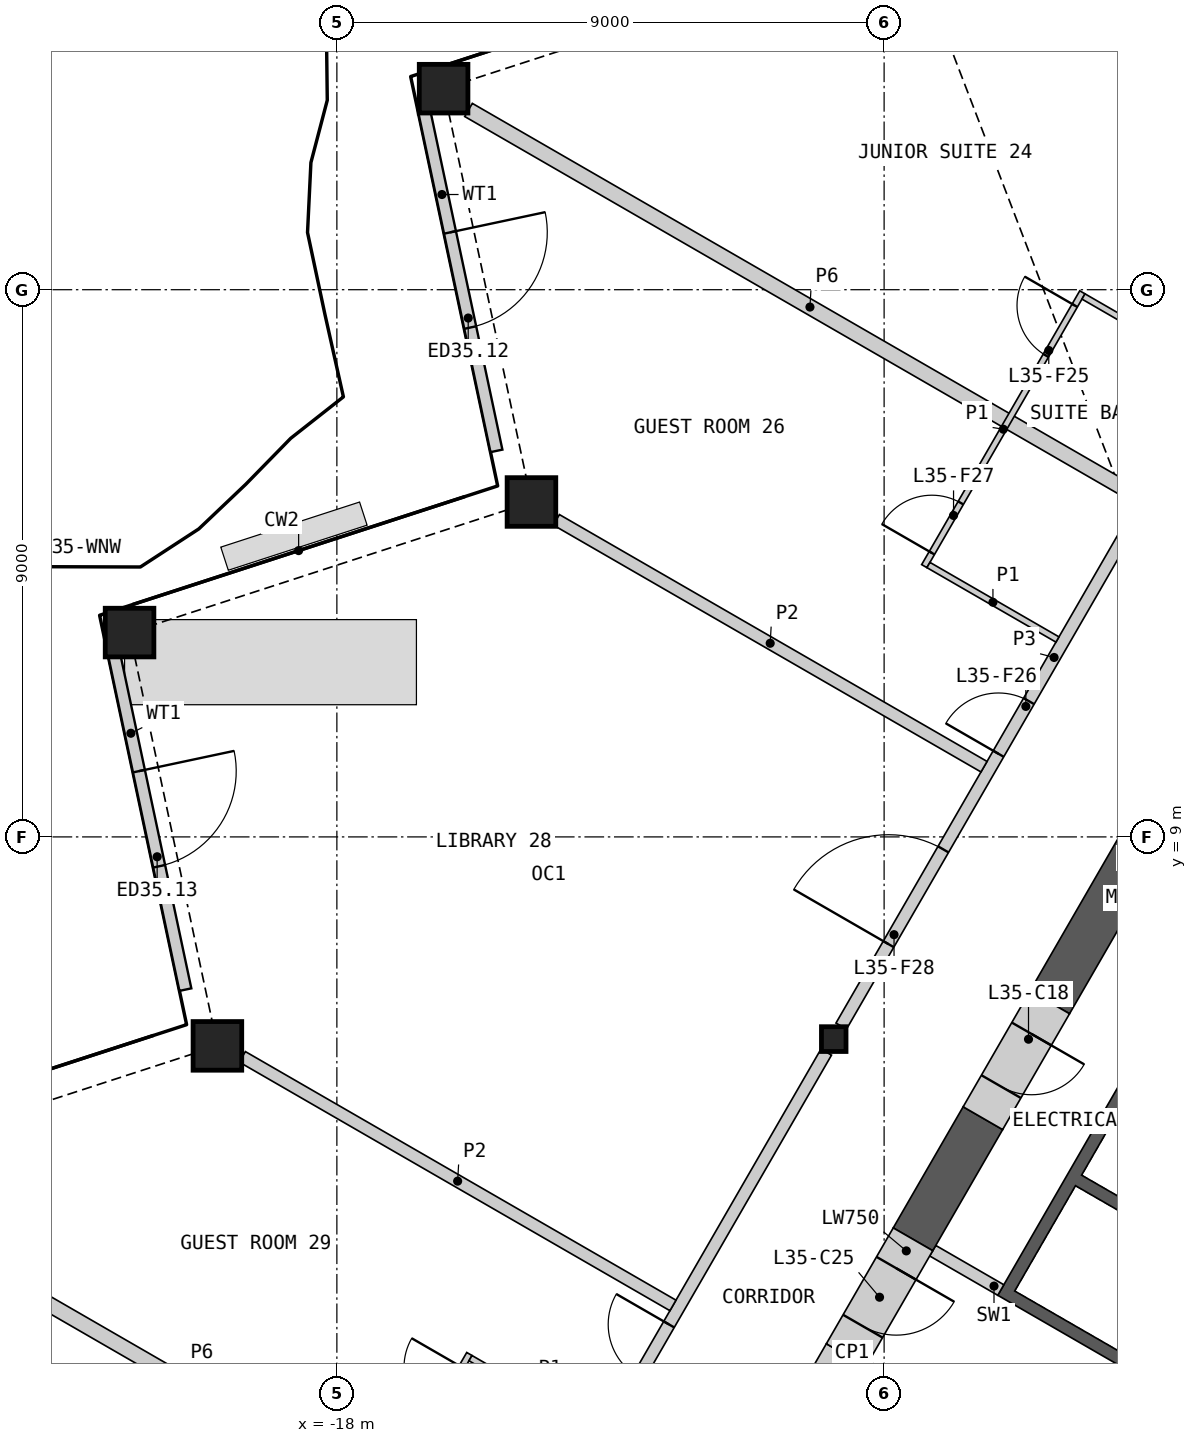
"""IFC4 building model, lengths in metres.
Left out: names, types, materials, properties, quantities, classifications, styles, units other than length and angle.
Written with IfcOpenShell. Run it as: python <this file> out.ifc"""

import sys

from ifc_helpers import new_model, si_unit, direction, frame, frame_2d, origin, origin_2d, place, context, subcontext, project, spatial, polyline, rectangle, hollow_rectangle, i_section, outline, extrude, element, fill, save


model = new_model("IFC4")
c1 = context("Model", 3, precision=1e-05, world=origin(), true_north=direction((0.0, 1.0)))
c2 = subcontext(c1, "Body", "Model", "MODEL_VIEW")
j1 = project(units=[si_unit("LENGTHUNIT", "METRE"), si_unit("PLANEANGLEUNIT", "RADIAN")], contexts=[c1])
p1 = place(None, origin())
s1 = spatial("IfcSite", under=j1, at=p1, CompositionType="ELEMENT")
p2 = place(p1, origin())
s2 = spatial("IfcBuilding", under=s1, at=p2, CompositionType="ELEMENT")
p3 = place(p2, frame((0.0, 0.0, 169.2)))
s3 = spatial("IfcBuildingStorey", under=s2, at=p3, CompositionType="ELEMENT", Elevation=169.2)
for number, where, z_axis, x_axis in (
    (1, (-16.245, 21.306, 0.0), (0.0, 0.0, 1.0), (1.0, 0.0, 0.0)),
    (2, (-14.8, 14.508, 0.0), (0.0, 0.0, 1.0), (1.0, 0.0, 0.0)),
    (3, (-21.409, 12.361, 0.0), (0.0, 0.0, 1.0), (1.0, 0.0, 0.0)),
    (4, (-19.965, 5.563, 0.0), (0.0, 0.0, 1.0), (1.0, 0.0, 0.0)),
):
    element("IfcColumn", number, at=place(p3, frame(where, z_axis=z_axis, x_axis=x_axis)), inside=s3, PredefinedType="COLUMN", context=c2, shape_type="SweptSolid", body=[
        extrude(hollow_rectangle(XDim=0.8, YDim=0.8, WallThickness=0.05, at=origin_2d()), origin(), (0.0, 0.0, 1.0), 3.6),
    ])
p4 = place(p3, frame((-9.828, 5.675, 0.0), z_axis=(0.0, 0.0, 1.0), x_axis=(1.0, 0.0, 0.0)))
e5 = element("IfcColumn", 5, at=p4, inside=s3, PredefinedType="COLUMN", context=c2, shape_type="SweptSolid", body=[
    extrude(i_section(OverallWidth=0.404, OverallDepth=0.407, WebThickness=0.027, FlangeThickness=0.044, at=origin_2d()), origin(), (0.0, 0.0, 1.0), 3.6),
])
p5 = place(p3, frame((-16.571, 20.971, 0.0), z_axis=(0.0, 0.0, 1.0), x_axis=(0.207872471739, -0.978155936184, 0.0)))
e6 = element("IfcWall", 6, at=p5, inside=s3, PredefinedType="SOLIDWALL", context=c2, shape_type="SweptSolid", body=[
    extrude(rectangle(XDim=5.748, YDim=0.2, at=frame_2d((2.874, 0.0))), origin(), (0.0, 0.0, 1.0), 2.701),
])
p6 = place(p5, frame((2.074, 0.0, 0.0)))
e7 = element("IfcOpeningElement", 7, at=p6, cuts=e6, PredefinedType="OPENING", context=c2, shape_type="SweptSolid", body=[
    extrude(rectangle(XDim=1.6, YDim=2.4, at=frame_2d((0.8, 1.2))), frame((0.0, 0.11, 0.0), z_axis=(0.0, -1.0, 0.0), x_axis=(1.0, 0.0, 0.0)), (0.0, 0.0, 1.0), 0.22),
])
p7 = place(p3, frame((-21.686, 12.111, 0.0), z_axis=(0.0, 0.0, 1.0), x_axis=(0.207872471739, -0.978155936184, 0.0)))
e8 = element("IfcWall", 8, at=p7, inside=s3, PredefinedType="SOLIDWALL", context=c2, shape_type="SweptSolid", body=[
    extrude(rectangle(XDim=5.748, YDim=0.2, at=frame_2d((2.874, 0.0))), origin(), (0.0, 0.0, 1.0), 2.701),
])
p8 = place(p7, frame((2.074, 0.0, 0.0)))
e9 = element("IfcOpeningElement", 9, at=p8, cuts=e8, PredefinedType="OPENING", context=c2, shape_type="SweptSolid", body=[
    extrude(rectangle(XDim=1.6, YDim=2.4, at=frame_2d((0.8, 1.2))), frame((0.0, 0.11, 0.0), z_axis=(0.0, -1.0, 0.0), x_axis=(1.0, 0.0, 0.0)), (0.0, 0.0, 1.0), 0.22),
])
p9 = place(p3, origin())
e10 = element("IfcWall", 10, at=p9, inside=s3, PredefinedType="SHEAR", context=c2, shape_type="SweptSolid", body=[
    extrude(outline(polyline([(-4.96, 0.208), (-7.131, 1.461), (-3.731, 7.35), (-1.561, 6.097), (-1.66, 5.924), (-3.652, 7.074), (-4.652, 5.342), (-2.66, 4.192), (-2.76, 4.019), (-4.752, 5.169), (-5.752, 3.437), (-3.76, 2.287), (-3.861, 2.113), (-5.852, 3.263), (-6.852, 1.531), (-4.861, 0.381), (-4.96, 0.208)])), origin(), (0.0, 0.0, 1.0), 3.25),
])
for number, where, z_axis, x_axis in (
    (11, (-7.081, 1.548, 0.0), (0.0, 0.0, 1.0), (-0.866, 0.5, 0.0)),
    (12, (-8.181, -0.357, 0.0), (0.0, 0.0, 1.0), (-0.866, 0.5, 0.0)),
):
    element("IfcWall", number, at=place(p3, frame(where, z_axis=z_axis, x_axis=x_axis)), inside=s3, PredefinedType="SHEAR", context=c2, shape_type="SweptSolid", body=[
        extrude(rectangle(XDim=1.293, YDim=0.2, at=frame_2d((0.646, 0.0))), origin(), (0.0, 0.0, 1.0), 3.25),
    ])
p10 = place(p3, frame((-4.817, 8.804, 0.0), z_axis=(0.0, 0.0, 1.0), x_axis=(-0.500029273391, -0.866008502124, 0.0)))
e13 = element("IfcWall", 13, at=p10, inside=s3, PredefinedType="SHEAR", context=c2, shape_type="SweptSolid", body=[
    extrude(rectangle(XDim=2.916, YDim=0.75, at=frame_2d((1.458, 0.0))), origin(), (0.0, 0.0, 1.0), 3.25),
])
p11 = place(p3, frame((-7.375, 4.374, 0.0), z_axis=(0.0, 0.0, 1.0), x_axis=(-0.499952165731, -0.866053019151, 0.0)))
e14 = element("IfcWall", 14, at=p11, inside=s3, PredefinedType="SHEAR", context=c2, shape_type="SweptSolid", body=[
    extrude(rectangle(XDim=2.3, YDim=0.75, at=frame_2d((1.15, 0.0))), origin(), (0.0, 0.0, 1.0), 3.25),
])
p12 = place(p3, frame((-6.275, 6.279, 0.0), z_axis=(0.0, 0.0, 1.0), x_axis=(-0.499946605688, -0.86605622881, 0.0)))
e15 = element("IfcWall", 15, at=p12, inside=s3, PredefinedType="SHEAR", context=c2, shape_type="SweptSolid", body=[
    extrude(rectangle(XDim=2.2, YDim=0.75, at=frame_2d((1.1, 0.0))), origin(), (0.0, 0.0, 1.0), 3.25),
])
p13 = place(p12, frame((0.6, 0.0, 0.0)))
e16 = element("IfcOpeningElement", 16, at=p13, cuts=e15, PredefinedType="OPENING", context=c2, shape_type="SweptSolid", body=[
    extrude(rectangle(XDim=1.0, YDim=2.1, at=frame_2d((0.5, 1.05))), frame((0.0, 0.385, 0.0), z_axis=(0.0, -1.0, 0.0), x_axis=(1.0, 0.0, 0.0)), (0.0, 0.0, 1.0), 0.77),
])
p14 = place(p3, frame((-9.625, 0.477, 0.0), z_axis=(0.0, 0.0, 1.0), x_axis=(-0.499995718215, -0.86602787586, 0.0)))
e17 = element("IfcWall", 17, at=p14, inside=s3, PredefinedType="SHEAR", context=c2, shape_type="SweptSolid", body=[
    extrude(rectangle(XDim=3.016, YDim=0.75, at=frame_2d((1.508, 0.0))), origin(), (0.0, 0.0, 1.0), 3.25),
])
p15 = place(p14, frame((1.4, 0.0, 0.0)))
e18 = element("IfcOpeningElement", 18, at=p15, cuts=e17, PredefinedType="OPENING", context=c2, shape_type="SweptSolid", body=[
    extrude(rectangle(XDim=1.0, YDim=2.1, at=frame_2d((0.5, 1.05))), frame((0.0, 0.385, 0.0), z_axis=(0.0, -1.0, 0.0), x_axis=(1.0, 0.0, 0.0)), (0.0, 0.0, 1.0), 0.77),
])
p16 = place(p3, frame((-8.525, 2.382, 0.0), z_axis=(0.0, 0.0, 1.0), x_axis=(-0.500077893725, -0.86598042715, 0.0)))
e19 = element("IfcWall", 19, at=p16, inside=s3, PredefinedType="SHEAR", context=c2, shape_type="SweptSolid", body=[
    extrude(rectangle(XDim=2.2, YDim=0.75, at=frame_2d((1.1, 0.0))), origin(), (0.0, 0.0, 1.0), 3.25),
])
p17 = place(p16, frame((0.55, 0.0, 0.0)))
e20 = element("IfcOpeningElement", 20, at=p17, cuts=e19, PredefinedType="OPENING", context=c2, shape_type="SweptSolid", body=[
    extrude(rectangle(XDim=1.1, YDim=2.1, at=frame_2d((0.55, 1.05))), frame((0.0, 0.385, 0.0), z_axis=(0.0, -1.0, 0.0), x_axis=(1.0, 0.0, 0.0)), (0.0, 0.0, 1.0), 0.77),
])
p18 = place(p3, frame((-26.164, 3.292, 0.0), z_axis=(0.0, 0.0, 1.0), x_axis=(0.866022412254, -0.500005181446, 0.0)))
e21 = element("IfcWall", 21, at=p18, inside=s3, PredefinedType="PARTITIONING", context=c2, shape_type="SweptSolid", body=[
    extrude(rectangle(XDim=13.081, YDim=0.25, at=frame_2d((6.541, 0.0))), origin(), (0.0, 0.0, 1.0), 2.404),
])
p19 = place(p3, frame((-15.835, 20.956, 0.0), z_axis=(0.0, 0.0, 1.0), x_axis=(0.866029765546, -0.499992445131, 0.0)))
e22 = element("IfcWall", 22, at=p19, inside=s3, PredefinedType="PARTITIONING", context=c2, shape_type="SweptSolid", body=[
    extrude(rectangle(XDim=12.968, YDim=0.25, at=frame_2d((6.484, 0.0))), origin(), (0.0, 0.0, 1.0), 2.404),
])
p20 = place(p3, frame((-9.705, 5.888, 0.0), z_axis=(0.0, 0.0, 1.0), x_axis=(0.50000393355, 0.866023132736, 0.0)))
e23 = element("IfcWall", 23, at=p20, inside=s3, PredefinedType="PARTITIONING", context=c2, shape_type="SweptSolid", body=[
    extrude(rectangle(XDim=9.335, YDim=0.2, at=frame_2d((4.667, 0.0))), origin(), (0.0, 0.0, 1.0), 3.25),
])
p21 = place(p20, frame((5.172, 0.0, 0.0)))
e24 = element("IfcOpeningElement", 24, at=p21, cuts=e23, PredefinedType="OPENING", context=c2, shape_type="SweptSolid", body=[
    extrude(rectangle(XDim=1.0, YDim=2.1, at=frame_2d((0.5, 1.05))), frame((0.0, 0.11, 0.0), z_axis=(0.0, -1.0, 0.0), x_axis=(1.0, 0.0, 0.0)), (0.0, 0.0, 1.0), 0.22),
])
p22 = place(p20, frame((1.556, 0.0, 0.0)))
e25 = element("IfcOpeningElement", 25, at=p22, cuts=e23, PredefinedType="OPENING", context=c2, shape_type="SweptSolid", body=[
    extrude(rectangle(XDim=1.8, YDim=2.1, at=frame_2d((0.9, 1.05))), frame((0.0, 0.11, 0.0), z_axis=(0.0, -1.0, 0.0), x_axis=(1.0, 0.0, 0.0)), (0.0, 0.0, 1.0), 0.22),
])
p23 = place(p3, frame((-14.619, -2.624, 0.0), z_axis=(0.0, 0.0, 1.0), x_axis=(0.50000393355, 0.866023132736, 0.0)))
e26 = element("IfcWall", 26, at=p23, inside=s3, PredefinedType="PARTITIONING", context=c2, shape_type="SweptSolid", body=[
    extrude(rectangle(XDim=9.335, YDim=0.2, at=frame_2d((4.667, 0.0))), origin(), (0.0, 0.0, 1.0), 3.25),
])
p24 = place(p23, frame((3.163, 0.0, 0.0)))
e27 = element("IfcOpeningElement", 27, at=p24, cuts=e26, PredefinedType="OPENING", context=c2, shape_type="SweptSolid", body=[
    extrude(rectangle(XDim=1.0, YDim=2.1, at=frame_2d((0.5, 1.05))), frame((0.0, 0.11, 0.0), z_axis=(0.0, -1.0, 0.0), x_axis=(1.0, 0.0, 0.0)), (0.0, 0.0, 1.0), 0.22),
])
p25 = place(p3, frame((-11.231, 29.842, 0.0), z_axis=(0.0, 0.0, 1.0), x_axis=(0.66019067586, -0.751098043871, 0.0)))
e28 = element("IfcWall", 28, at=p25, inside=s3, PredefinedType="PARTITIONING", context=c2, shape_type="SweptSolid", body=[
    extrude(rectangle(XDim=13.938, YDim=0.2, at=frame_2d((6.969, 0.0))), origin(), (0.0, 0.0, 1.0), 2.404),
])
p26 = place(p3, frame((-19.555, 5.383, 0.0), z_axis=(0.0, 0.0, 1.0), x_axis=(0.866027979776, -0.499995538225, 0.0)))
e29 = element("IfcWall", 29, at=p26, inside=s3, PredefinedType="PARTITIONING", context=c2, shape_type="SweptSolid", body=[
    extrude(rectangle(XDim=8.177, YDim=0.2, at=frame_2d((4.089, 0.0))), origin(), (0.0, 0.0, 1.0), 2.404),
])
p27 = place(p3, frame((-14.39, 14.215, 0.0), z_axis=(0.0, 0.0, 1.0), x_axis=(0.86602738064, -0.499996575971, 0.0)))
e30 = element("IfcWall", 30, at=p27, inside=s3, PredefinedType="PARTITIONING", context=c2, shape_type="SweptSolid", body=[
    extrude(rectangle(XDim=8.121, YDim=0.2, at=frame_2d((4.06, 0.0))), origin(), (0.0, 0.0, 1.0), 2.404),
])
p28 = place(p3, frame((-18.421, -4.008, 0.0), z_axis=(0.0, 0.0, 1.0), x_axis=(0.500006934395, 0.866021400173, 0.0)))
e31 = element("IfcWall", 31, at=p28, inside=s3, PredefinedType="PARTITIONING", context=c2, shape_type="SweptSolid", body=[
    extrude(rectangle(XDim=5.2, YDim=0.1, at=frame_2d((2.6, 0.0))), origin(), (0.0, 0.0, 1.0), 2.404),
])
p29 = place(p28, frame((4.0, 0.0, 0.0)))
e32 = element("IfcOpeningElement", 32, at=p29, cuts=e31, PredefinedType="OPENING", context=c2, shape_type="SweptSolid", body=[
    extrude(rectangle(XDim=0.95, YDim=2.1, at=frame_2d((0.475, 1.05))), frame((0.0, 0.06, 0.0), z_axis=(0.0, -1.0, 0.0), x_axis=(1.0, 0.0, 0.0)), (0.0, 0.0, 1.0), 0.12),
])
p30 = place(p28, frame((0.25, 0.0, 0.0)))
e33 = element("IfcOpeningElement", 33, at=p30, cuts=e31, PredefinedType="OPENING", context=c2, shape_type="SweptSolid", body=[
    extrude(rectangle(XDim=0.95, YDim=2.1, at=frame_2d((0.475, 1.05))), frame((0.0, 0.06, 0.0), z_axis=(0.0, -1.0, 0.0), x_axis=(1.0, 0.0, 0.0)), (0.0, 0.0, 1.0), 0.12),
])
p31 = place(p3, frame((-8.339, 13.454, 0.0), z_axis=(0.0, 0.0, 1.0), x_axis=(0.499992051641, 0.866029992723, 0.0)))
e34 = element("IfcWall", 34, at=p31, inside=s3, PredefinedType="PARTITIONING", context=c2, shape_type="SweptSolid", body=[
    extrude(rectangle(XDim=5.2, YDim=0.1, at=frame_2d((2.6, 0.0))), origin(), (0.0, 0.0, 1.0), 2.404),
])
p32 = place(p31, frame((4.0, 0.0, 0.0)))
e35 = element("IfcOpeningElement", 35, at=p32, cuts=e34, PredefinedType="OPENING", context=c2, shape_type="SweptSolid", body=[
    extrude(rectangle(XDim=0.95, YDim=2.1, at=frame_2d((0.475, 1.05))), frame((0.0, 0.06, 0.0), z_axis=(0.0, -1.0, 0.0), x_axis=(1.0, 0.0, 0.0)), (0.0, 0.0, 1.0), 0.12),
])
p33 = place(p31, frame((0.25, 0.0, 0.0)))
e36 = element("IfcOpeningElement", 36, at=p33, cuts=e34, PredefinedType="OPENING", context=c2, shape_type="SweptSolid", body=[
    extrude(rectangle(XDim=0.95, YDim=2.1, at=frame_2d((0.475, 1.05))), frame((0.0, 0.06, 0.0), z_axis=(0.0, -1.0, 0.0), x_axis=(1.0, 0.0, 0.0)), (0.0, 0.0, 1.0), 0.12),
])
p34 = place(p3, frame((-15.802, 0.427, 0.0), z_axis=(0.0, 0.0, 1.0), x_axis=(0.866032905446, -0.499987006516, 0.0)))
e37 = element("IfcWall", 37, at=p34, inside=s3, PredefinedType="PARTITIONING", context=c2, shape_type="SweptSolid", body=[
    extrude(rectangle(XDim=2.45, YDim=0.1, at=frame_2d((1.225, 0.0))), origin(), (0.0, 0.0, 1.0), 2.404),
])
p35 = place(p3, frame((-8.271, 13.472, 0.0), z_axis=(0.0, 0.0, 1.0), x_axis=(0.865989751695, -0.500061746146, 0.0)))
e38 = element("IfcWall", 38, at=p35, inside=s3, PredefinedType="PARTITIONING", context=c2, shape_type="SweptSolid", body=[
    extrude(rectangle(XDim=2.45, YDim=0.1, at=frame_2d((1.225, 0.0))), origin(), (0.0, 0.0, 1.0), 2.404),
])
p36 = place(p3, frame((-5.721, 17.889, 0.0), z_axis=(0.0, 0.0, 1.0), x_axis=(0.866014668023, -0.500018594424, 0.0)))
e39 = element("IfcWall", 39, at=p36, inside=s3, PredefinedType="PARTITIONING", context=c2, shape_type="SweptSolid", body=[
    extrude(rectangle(XDim=2.45, YDim=0.1, at=frame_2d((1.225, 0.0))), origin(), (0.0, 0.0, 1.0), 2.404),
])
p37 = place(p6, origin())
e40 = element("IfcDoor", 40, at=p37, inside=s3, OperationType="DOUBLE_DOOR_SINGLE_SWING", PredefinedType="DOOR", context=c2, shape_type="SweptSolid", body=[
    extrude(rectangle(XDim=1.6, YDim=2.4, at=frame_2d((0.8, 1.2))), frame((0.0, 0.025, 0.0), z_axis=(0.0, -1.0, 0.0), x_axis=(1.0, 0.0, 0.0)), (0.0, 0.0, 1.0), 0.05),
])
fill(e7, e40)
p38 = place(p8, origin())
e41 = element("IfcDoor", 41, at=p38, inside=s3, OperationType="DOUBLE_DOOR_SINGLE_SWING", PredefinedType="DOOR", context=c2, shape_type="SweptSolid", body=[
    extrude(rectangle(XDim=1.6, YDim=2.4, at=frame_2d((0.8, 1.2))), frame((0.0, 0.025, 0.0), z_axis=(0.0, -1.0, 0.0), x_axis=(1.0, 0.0, 0.0)), (0.0, 0.0, 1.0), 0.05),
])
fill(e9, e41)
p39 = place(p13, origin())
e42 = element("IfcDoor", 42, at=p39, inside=s3, OperationType="SINGLE_SWING_LEFT", PredefinedType="DOOR", context=c2, shape_type="SweptSolid", body=[
    extrude(rectangle(XDim=1.0, YDim=2.1, at=frame_2d((0.5, 1.05))), frame((0.0, 0.13, 0.0), z_axis=(0.0, -1.0, 0.0), x_axis=(1.0, 0.0, 0.0)), (0.0, 0.0, 1.0), 0.05),
])
fill(e16, e42)
p40 = place(p17, origin())
e43 = element("IfcDoor", 43, at=p40, inside=s3, OperationType="SINGLE_SWING_LEFT", PredefinedType="DOOR", context=c2, shape_type="SweptSolid", body=[
    extrude(rectangle(XDim=1.1, YDim=2.1, at=frame_2d((0.55, 1.05))), frame((0.0, 0.13, 0.0), z_axis=(0.0, -1.0, 0.0), x_axis=(1.0, 0.0, 0.0)), (0.0, 0.0, 1.0), 0.05),
])
fill(e20, e43)
p41 = place(p32, origin())
e44 = element("IfcDoor", 44, at=p41, inside=s3, OperationType="SINGLE_SWING_RIGHT", PredefinedType="DOOR", context=c2, shape_type="SweptSolid", body=[
    extrude(rectangle(XDim=0.95, YDim=2.1, at=frame_2d((0.475, 1.05))), frame((0.0, 0.025, 0.0), z_axis=(0.0, -1.0, 0.0), x_axis=(1.0, 0.0, 0.0)), (0.0, 0.0, 1.0), 0.05),
])
fill(e35, e44)
p42 = place(p21, origin())
e45 = element("IfcDoor", 45, at=p42, inside=s3, OperationType="SINGLE_SWING_LEFT", PredefinedType="DOOR", context=c2, shape_type="SweptSolid", body=[
    extrude(rectangle(XDim=1.0, YDim=2.1, at=frame_2d((0.5, 1.05))), frame((0.0, 0.025, 0.0), z_axis=(0.0, -1.0, 0.0), x_axis=(1.0, 0.0, 0.0)), (0.0, 0.0, 1.0), 0.05),
])
fill(e24, e45)
p43 = place(p33, origin())
e46 = element("IfcDoor", 46, at=p43, inside=s3, OperationType="SINGLE_SWING_LEFT", PredefinedType="DOOR", context=c2, shape_type="SweptSolid", body=[
    extrude(rectangle(XDim=0.95, YDim=2.1, at=frame_2d((0.475, 1.05))), frame((0.0, 0.025, 0.0), z_axis=(0.0, -1.0, 0.0), x_axis=(1.0, 0.0, 0.0)), (0.0, 0.0, 1.0), 0.05),
])
fill(e36, e46)
p44 = place(p22, origin())
e47 = element("IfcDoor", 47, at=p44, inside=s3, OperationType="DOUBLE_DOOR_SINGLE_SWING", PredefinedType="DOOR", context=c2, shape_type="SweptSolid", body=[
    extrude(rectangle(XDim=1.8, YDim=2.1, at=frame_2d((0.9, 1.05))), frame((0.0, 0.025, 0.0), z_axis=(0.0, -1.0, 0.0), x_axis=(1.0, 0.0, 0.0)), (0.0, 0.0, 1.0), 0.05),
])
fill(e25, e47)
p45 = place(p24, origin())
e48 = element("IfcDoor", 48, at=p45, inside=s3, OperationType="SINGLE_SWING_RIGHT", PredefinedType="DOOR", context=c2, shape_type="SweptSolid", body=[
    extrude(rectangle(XDim=1.0, YDim=2.1, at=frame_2d((0.5, 1.05))), frame((0.0, 0.025, 0.0), z_axis=(0.0, -1.0, 0.0), x_axis=(1.0, 0.0, 0.0)), (0.0, 0.0, 1.0), 0.05),
])
fill(e27, e48)
save(model, sys.argv[1])
